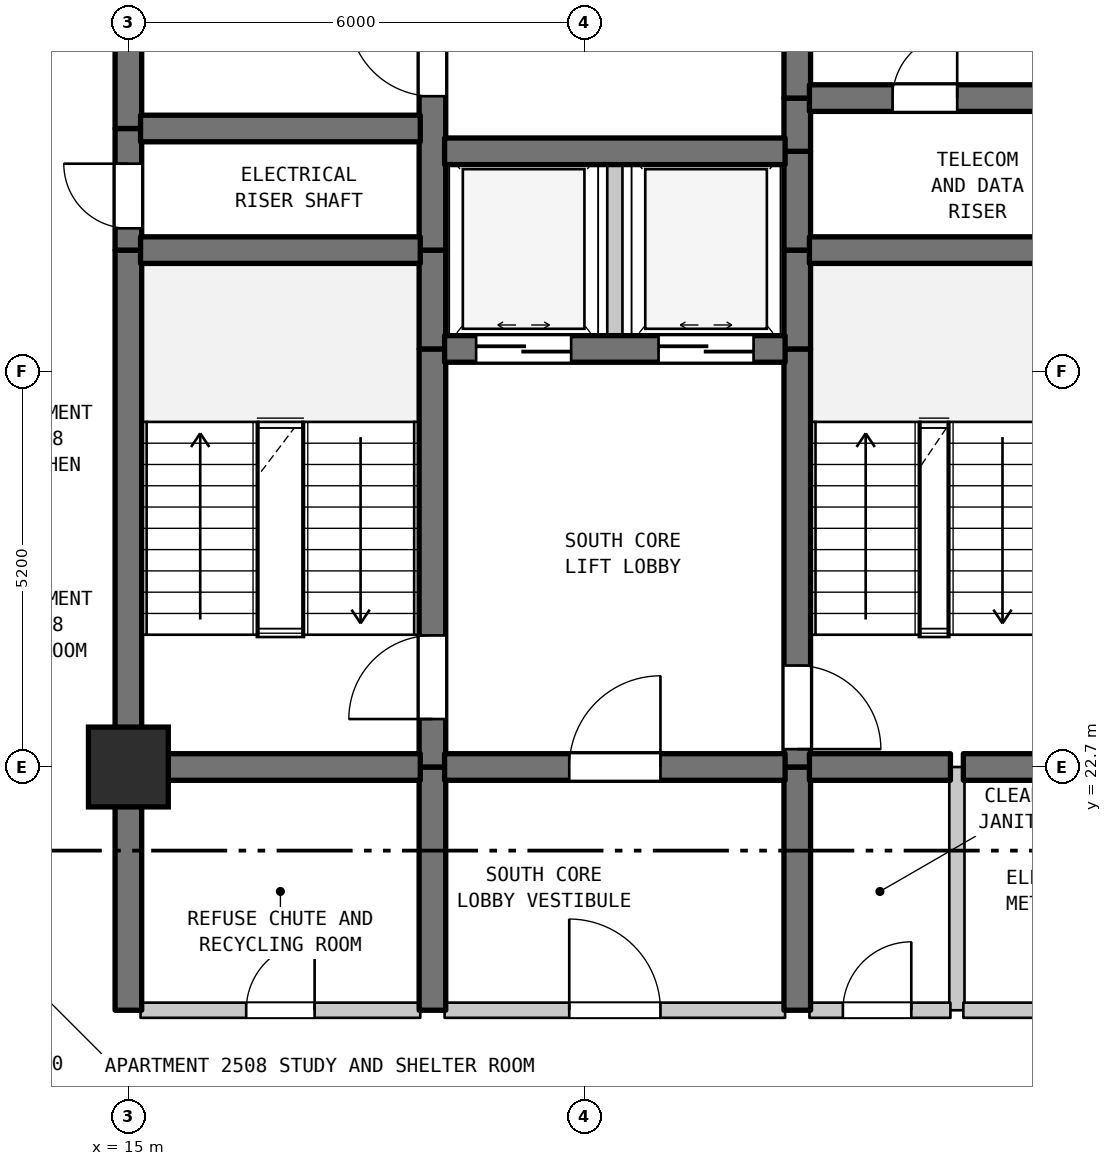
"""IFC4 building model, lengths in metres.
Left out: names, types, materials, properties, quantities, classifications, styles, units other than length and angle.
Written with IfcOpenShell. Run it as: python <this file> out.ifc"""

import sys

from ifc_helpers import new_model, si_unit, direction, frame, frame_2d, origin, origin_2d, place, context, subcontext, project, spatial, rectangle, extrude, element, fill, save


model = new_model("IFC4")
c1 = context("Model", 3, precision=1e-05, world=origin(), true_north=direction((0.0, 1.0)))
c2 = subcontext(c1, "Body", "Model", "MODEL_VIEW")
j1 = project(units=[si_unit("LENGTHUNIT", "METRE"), si_unit("PLANEANGLEUNIT", "RADIAN")], contexts=[c1])
p1 = place(None, origin())
s1 = spatial("IfcSite", under=j1, at=p1, CompositionType="ELEMENT")
p2 = place(p1, origin())
s2 = spatial("IfcBuilding", under=s1, at=p2, CompositionType="ELEMENT")
p3 = place(p2, frame((0.0, 0.0, 105.7)))
s3 = spatial("IfcBuildingStorey", under=s2, at=p3, CompositionType="ELEMENT", Elevation=105.7)
p4 = place(p3, frame((15.0, 22.7, 0.0), z_axis=(0.0, 0.0, 1.0), x_axis=(1.0, 0.0, 0.0)))
e1 = element("IfcColumn", 1, at=p4, inside=s3, PredefinedType="COLUMN", context=c2, shape_type="SweptSolid", body=[
    extrude(rectangle(XDim=1.05, YDim=1.05, at=origin_2d()), origin(), (0.0, 0.0, 1.0), 3.7),
])
p5 = place(p3, frame((15.0, 19.5, 0.0), z_axis=(0.0, 0.0, 1.0), x_axis=(0.0, 1.0, 0.0)))
e2 = element("IfcWall", 2, at=p5, inside=s3, PredefinedType="SHEAR", context=c2, shape_type="SweptSolid", body=[
    extrude(rectangle(XDim=3.2, YDim=0.35, at=frame_2d((1.6, 0.0))), origin(), (0.0, 0.0, 1.0), 3.385),
])
p6 = place(p3, frame((15.0, 22.7, 0.0), z_axis=(0.0, 0.0, 1.0), x_axis=(0.0, 1.0, 0.0)))
e3 = element("IfcWall", 3, at=p6, inside=s3, PredefinedType="SHEAR", context=c2, shape_type="SweptSolid", body=[
    extrude(rectangle(XDim=6.8, YDim=0.35, at=frame_2d((3.4, 0.0))), origin(), (0.0, 0.0, 1.0), 3.385),
])
p7 = place(p3, frame((15.0, 29.5, 0.0), z_axis=(0.0, 0.0, 1.0), x_axis=(0.0, 1.0, 0.0)))
e4 = element("IfcWall", 4, at=p7, inside=s3, PredefinedType="SHEAR", context=c2, shape_type="SweptSolid", body=[
    extrude(rectangle(XDim=1.6, YDim=0.35, at=frame_2d((0.8, 0.0))), origin(), (0.0, 0.0, 1.0), 3.385),
])
p8 = place(p7, frame((0.287, 0.0, 0.0)))
e5 = element("IfcOpeningElement", 5, at=p8, cuts=e4, PredefinedType="OPENING", context=c2, shape_type="SweptSolid", body=[
    extrude(rectangle(XDim=0.85, YDim=2.1, at=frame_2d((0.425, 1.05))), frame((0.0, 0.185, 0.0), z_axis=(0.0, -1.0, 0.0), x_axis=(1.0, 0.0, 0.0)), (0.0, 0.0, 1.0), 0.37),
])
p9 = place(p3, frame((15.0, 31.1, 0.0), z_axis=(0.0, 0.0, 1.0), x_axis=(0.0, 1.0, 0.0)))
e6 = element("IfcWall", 6, at=p9, inside=s3, PredefinedType="SHEAR", context=c2, shape_type="SweptSolid", body=[
    extrude(rectangle(XDim=6.8, YDim=0.35, at=frame_2d((3.4, 0.0))), origin(), (0.0, 0.0, 1.0), 3.385),
])
p10 = place(p3, frame((19.0, 19.5, 0.0), z_axis=(0.0, 0.0, 1.0), x_axis=(0.0, 1.0, 0.0)))
e7 = element("IfcWall", 7, at=p10, inside=s3, PredefinedType="SHEAR", context=c2, shape_type="SweptSolid", body=[
    extrude(rectangle(XDim=3.2, YDim=0.35, at=frame_2d((1.6, 0.0))), origin(), (0.0, 0.0, 1.0), 3.385),
])
p11 = place(p3, frame((19.0, 22.7, 0.0), z_axis=(0.0, 0.0, 1.0), x_axis=(0.0, 1.0, 0.0)))
e8 = element("IfcWall", 8, at=p11, inside=s3, PredefinedType="SHEAR", context=c2, shape_type="SweptSolid", body=[
    extrude(rectangle(XDim=5.5, YDim=0.35, at=frame_2d((2.75, 0.0))), origin(), (0.0, 0.0, 1.0), 3.385),
])
p12 = place(p11, frame((0.631, 0.0, 0.0)))
e9 = element("IfcOpeningElement", 9, at=p12, cuts=e8, PredefinedType="OPENING", context=c2, shape_type="SweptSolid", body=[
    extrude(rectangle(XDim=1.1, YDim=2.15, at=frame_2d((0.55, 1.075))), frame((0.0, 0.185, 0.0), z_axis=(0.0, -1.0, 0.0), x_axis=(1.0, 0.0, 0.0)), (0.0, 0.0, 1.0), 0.37),
])
p13 = place(p3, frame((19.0, 28.2, 0.0), z_axis=(0.0, 0.0, 1.0), x_axis=(0.0, 1.0, 0.0)))
e10 = element("IfcWall", 10, at=p13, inside=s3, PredefinedType="SHEAR", context=c2, shape_type="SweptSolid", body=[
    extrude(rectangle(XDim=1.3, YDim=0.35, at=frame_2d((0.65, 0.0))), origin(), (0.0, 0.0, 1.0), 3.385),
])
p14 = place(p3, frame((19.0, 29.5, 0.0), z_axis=(0.0, 0.0, 1.0), x_axis=(0.0, 1.0, 0.0)))
e11 = element("IfcWall", 11, at=p14, inside=s3, PredefinedType="SHEAR", context=c2, shape_type="SweptSolid", body=[
    extrude(rectangle(XDim=5.5, YDim=0.35, at=frame_2d((2.75, 0.0))), origin(), (0.0, 0.0, 1.0), 3.385),
])
p15 = place(p14, frame((2.025, 0.0, 0.0)))
e12 = element("IfcOpeningElement", 12, at=p15, cuts=e11, PredefinedType="OPENING", context=c2, shape_type="SweptSolid", body=[
    extrude(rectangle(XDim=1.1, YDim=2.15, at=frame_2d((0.55, 1.075))), frame((0.0, 0.185, 0.0), z_axis=(0.0, -1.0, 0.0), x_axis=(1.0, 0.0, 0.0)), (0.0, 0.0, 1.0), 0.37),
])
p16 = place(p3, frame((21.4, 28.2, 0.0), z_axis=(0.0, 0.0, 1.0), x_axis=(0.0, 1.0, 0.0)))
e13 = element("IfcWall", 13, at=p16, inside=s3, PredefinedType="STANDARD", context=c2, shape_type="SweptSolid", body=[
    extrude(rectangle(XDim=2.6, YDim=0.2, at=frame_2d((1.3, 0.0))), origin(), (0.0, 0.0, 1.0), 3.385),
])
p17 = place(p3, frame((23.8, 19.5, 0.0), z_axis=(0.0, 0.0, 1.0), x_axis=(0.0, 1.0, 0.0)))
e14 = element("IfcWall", 14, at=p17, inside=s3, PredefinedType="SHEAR", context=c2, shape_type="SweptSolid", body=[
    extrude(rectangle(XDim=3.2, YDim=0.35, at=frame_2d((1.6, 0.0))), origin(), (0.0, 0.0, 1.0), 3.385),
])
p18 = place(p3, frame((23.8, 22.7, 0.0), z_axis=(0.0, 0.0, 1.0), x_axis=(0.0, 1.0, 0.0)))
e15 = element("IfcWall", 15, at=p18, inside=s3, PredefinedType="SHEAR", context=c2, shape_type="SweptSolid", body=[
    extrude(rectangle(XDim=5.5, YDim=0.35, at=frame_2d((2.75, 0.0))), origin(), (0.0, 0.0, 1.0), 3.385),
])
p19 = place(p18, frame((0.235, 0.0, 0.0)))
e16 = element("IfcOpeningElement", 16, at=p19, cuts=e15, PredefinedType="OPENING", context=c2, shape_type="SweptSolid", body=[
    extrude(rectangle(XDim=1.1, YDim=2.15, at=frame_2d((0.55, 1.075))), frame((0.0, 0.185, 0.0), z_axis=(0.0, -1.0, 0.0), x_axis=(1.0, 0.0, 0.0)), (0.0, 0.0, 1.0), 0.37),
])
for number, where, z_axis, x_axis in (
    (17, (23.8, 28.2, 0.0), (0.0, 0.0, 1.0), (0.0, 1.0, 0.0)),
    (18, (23.8, 29.5, 0.0), (0.0, 0.0, 1.0), (0.0, 1.0, 0.0)),
):
    element("IfcWall", number, at=place(p3, frame(where, z_axis=z_axis, x_axis=x_axis)), inside=s3, PredefinedType="SHEAR", context=c2, shape_type="SweptSolid", body=[
        extrude(rectangle(XDim=1.3, YDim=0.35, at=frame_2d((0.65, 0.0))), origin(), (0.0, 0.0, 1.0), 3.385),
    ])
p20 = place(p3, frame((23.8, 30.8, 0.0), z_axis=(0.0, 0.0, 1.0), x_axis=(0.0, 1.0, 0.0)))
e19 = element("IfcWall", 19, at=p20, inside=s3, PredefinedType="SHEAR", context=c2, shape_type="SweptSolid", body=[
    extrude(rectangle(XDim=0.7, YDim=0.35, at=frame_2d((0.35, 0.0))), origin(), (0.0, 0.0, 1.0), 3.385),
])
p21 = place(p3, frame((23.8, 31.5, 0.0), z_axis=(0.0, 0.0, 1.0), x_axis=(0.0, 1.0, 0.0)))
e20 = element("IfcWall", 20, at=p21, inside=s3, PredefinedType="SHEAR", context=c2, shape_type="SweptSolid", body=[
    extrude(rectangle(XDim=3.5, YDim=0.35, at=frame_2d((1.75, 0.0))), origin(), (0.0, 0.0, 1.0), 3.385),
])
p22 = place(p21, frame((1.127, 0.0, 0.0)))
e21 = element("IfcOpeningElement", 21, at=p22, cuts=e20, PredefinedType="OPENING", context=c2, shape_type="SweptSolid", body=[
    extrude(rectangle(XDim=1.1, YDim=2.15, at=frame_2d((0.55, 1.075))), frame((0.0, 0.185, 0.0), z_axis=(0.0, -1.0, 0.0), x_axis=(1.0, 0.0, 0.0)), (0.0, 0.0, 1.0), 0.37),
])
p23 = place(p3, frame((25.9, 19.5, 0.0), z_axis=(0.0, 0.0, 1.0), x_axis=(0.0, 1.0, 0.0)))
e22 = element("IfcWall", 22, at=p23, inside=s3, PredefinedType="STANDARD", context=c2, shape_type="SweptSolid", body=[
    extrude(rectangle(XDim=3.2, YDim=0.2, at=frame_2d((1.6, 0.0))), origin(), (0.0, 0.0, 1.0), 3.385),
])
p24 = place(p3, frame((15.16, 19.5, 0.0), z_axis=(0.0, 0.0, 1.0), x_axis=(1.0, 0.0, 0.0)))
e23 = element("IfcWall", 23, at=p24, inside=s3, PredefinedType="STANDARD", context=c2, shape_type="SweptSolid", body=[
    extrude(rectangle(XDim=3.68, YDim=0.2, at=frame_2d((1.84, 0.0))), origin(), (0.0, 0.0, 1.0), 3.385),
])
p25 = place(p24, frame((1.39, 0.0, 0.0)))
e24 = element("IfcOpeningElement", 24, at=p25, cuts=e23, PredefinedType="OPENING", context=c2, shape_type="SweptSolid", body=[
    extrude(rectangle(XDim=0.9, YDim=2.15, at=frame_2d((0.45, 1.075))), frame((0.0, 0.11, 0.0), z_axis=(0.0, -1.0, 0.0), x_axis=(1.0, 0.0, 0.0)), (0.0, 0.0, 1.0), 0.22),
])
p26 = place(p3, frame((19.16, 19.5, 0.0), z_axis=(0.0, 0.0, 1.0), x_axis=(1.0, 0.0, 0.0)))
e25 = element("IfcWall", 25, at=p26, inside=s3, PredefinedType="STANDARD", context=c2, shape_type="SweptSolid", body=[
    extrude(rectangle(XDim=4.48, YDim=0.2, at=frame_2d((2.24, 0.0))), origin(), (0.0, 0.0, 1.0), 3.385),
])
p27 = place(p26, frame((1.64, 0.0, 0.0)))
e26 = element("IfcOpeningElement", 26, at=p27, cuts=e25, PredefinedType="OPENING", context=c2, shape_type="SweptSolid", body=[
    extrude(rectangle(XDim=1.2, YDim=2.2, at=frame_2d((0.6, 1.1))), frame((0.0, 0.11, 0.0), z_axis=(0.0, -1.0, 0.0), x_axis=(1.0, 0.0, 0.0)), (0.0, 0.0, 1.0), 0.22),
])
p28 = place(p3, frame((23.96, 19.5, 0.0), z_axis=(0.0, 0.0, 1.0), x_axis=(1.0, 0.0, 0.0)))
e27 = element("IfcWall", 27, at=p28, inside=s3, PredefinedType="STANDARD", context=c2, shape_type="SweptSolid", body=[
    extrude(rectangle(XDim=1.855, YDim=0.2, at=frame_2d((0.927, 0.0))), origin(), (0.0, 0.0, 1.0), 3.385),
])
p29 = place(p28, frame((0.44, 0.0, 0.0)))
e28 = element("IfcOpeningElement", 28, at=p29, cuts=e27, PredefinedType="OPENING", context=c2, shape_type="SweptSolid", body=[
    extrude(rectangle(XDim=0.9, YDim=2.15, at=frame_2d((0.45, 1.075))), frame((0.0, 0.11, 0.0), z_axis=(0.0, -1.0, 0.0), x_axis=(1.0, 0.0, 0.0)), (0.0, 0.0, 1.0), 0.22),
])
p30 = place(p3, frame((25.985, 19.5, 0.0), z_axis=(0.0, 0.0, 1.0), x_axis=(1.0, 0.0, 0.0)))
e29 = element("IfcWall", 29, at=p30, inside=s3, PredefinedType="STANDARD", context=c2, shape_type="SweptSolid", body=[
    extrude(rectangle(XDim=4.655, YDim=0.2, at=frame_2d((2.327, 0.0))), origin(), (0.0, 0.0, 1.0), 3.385),
])
p31 = place(p30, frame((1.845, 0.0, 0.0)))
e30 = element("IfcOpeningElement", 30, at=p31, cuts=e29, PredefinedType="OPENING", context=c2, shape_type="SweptSolid", body=[
    extrude(rectangle(XDim=0.9, YDim=2.15, at=frame_2d((0.45, 1.075))), frame((0.0, 0.11, 0.0), z_axis=(0.0, -1.0, 0.0), x_axis=(1.0, 0.0, 0.0)), (0.0, 0.0, 1.0), 0.22),
])
p32 = place(p3, frame((15.16, 22.7, 0.0), z_axis=(0.0, 0.0, 1.0), x_axis=(1.0, 0.0, 0.0)))
e31 = element("IfcWall", 31, at=p32, inside=s3, PredefinedType="SHEAR", context=c2, shape_type="SweptSolid", body=[
    extrude(rectangle(XDim=3.68, YDim=0.35, at=frame_2d((1.84, 0.0))), origin(), (0.0, 0.0, 1.0), 3.385),
])
p33 = place(p3, frame((19.16, 22.7, 0.0), z_axis=(0.0, 0.0, 1.0), x_axis=(1.0, 0.0, 0.0)))
e32 = element("IfcWall", 32, at=p33, inside=s3, PredefinedType="SHEAR", context=c2, shape_type="SweptSolid", body=[
    extrude(rectangle(XDim=4.48, YDim=0.35, at=frame_2d((2.24, 0.0))), origin(), (0.0, 0.0, 1.0), 3.385),
])
p34 = place(p33, frame((1.64, 0.0, 0.0)))
e33 = element("IfcOpeningElement", 33, at=p34, cuts=e32, PredefinedType="OPENING", context=c2, shape_type="SweptSolid", body=[
    extrude(rectangle(XDim=1.2, YDim=2.2, at=frame_2d((0.6, 1.1))), frame((0.0, 0.185, 0.0), z_axis=(0.0, -1.0, 0.0), x_axis=(1.0, 0.0, 0.0)), (0.0, 0.0, 1.0), 0.37),
])
p35 = place(p3, frame((23.96, 22.7, 0.0), z_axis=(0.0, 0.0, 1.0), x_axis=(1.0, 0.0, 0.0)))
e34 = element("IfcWall", 34, at=p35, inside=s3, PredefinedType="SHEAR", context=c2, shape_type="SweptSolid", body=[
    extrude(rectangle(XDim=1.855, YDim=0.35, at=frame_2d((0.927, 0.0))), origin(), (0.0, 0.0, 1.0), 3.385),
])
p36 = place(p3, frame((25.985, 22.7, 0.0), z_axis=(0.0, 0.0, 1.0), x_axis=(1.0, 0.0, 0.0)))
e35 = element("IfcWall", 35, at=p36, inside=s3, PredefinedType="SHEAR", context=c2, shape_type="SweptSolid", body=[
    extrude(rectangle(XDim=1.155, YDim=0.35, at=frame_2d((0.577, 0.0))), origin(), (0.0, 0.0, 1.0), 3.385),
])
p37 = place(p3, frame((19.16, 28.2, 0.0), z_axis=(0.0, 0.0, 1.0), x_axis=(1.0, 0.0, 0.0)))
e36 = element("IfcWall", 36, at=p37, inside=s3, PredefinedType="SHEAR", context=c2, shape_type="SweptSolid", body=[
    extrude(rectangle(XDim=4.48, YDim=0.35, at=frame_2d((2.24, 0.0))), origin(), (0.0, 0.0, 1.0), 3.385),
])
p38 = place(p37, frame((0.415, 0.0, 0.0)))
e37 = element("IfcOpeningElement", 37, at=p38, cuts=e36, PredefinedType="OPENING", context=c2, shape_type="SweptSolid", body=[
    extrude(rectangle(XDim=1.25, YDim=2.2, at=frame_2d((0.625, 1.1))), frame((0.0, 0.185, 0.0), z_axis=(0.0, -1.0, 0.0), x_axis=(1.0, 0.0, 0.0)), (0.0, 0.0, 1.0), 0.37),
])
p39 = place(p37, frame((2.815, 0.0, 0.0)))
e38 = element("IfcOpeningElement", 38, at=p39, cuts=e36, PredefinedType="OPENING", context=c2, shape_type="SweptSolid", body=[
    extrude(rectangle(XDim=1.25, YDim=2.2, at=frame_2d((0.625, 1.1))), frame((0.0, 0.185, 0.0), z_axis=(0.0, -1.0, 0.0), x_axis=(1.0, 0.0, 0.0)), (0.0, 0.0, 1.0), 0.37),
])
p40 = place(p3, frame((15.16, 29.5, 0.0), z_axis=(0.0, 0.0, 1.0), x_axis=(1.0, 0.0, 0.0)))
e39 = element("IfcWall", 39, at=p40, inside=s3, PredefinedType="SHEAR", context=c2, shape_type="SweptSolid", body=[
    extrude(rectangle(XDim=3.68, YDim=0.35, at=frame_2d((1.84, 0.0))), origin(), (0.0, 0.0, 1.0), 3.385),
])
p41 = place(p3, frame((23.96, 29.5, 0.0), z_axis=(0.0, 0.0, 1.0), x_axis=(1.0, 0.0, 0.0)))
e40 = element("IfcWall", 40, at=p41, inside=s3, PredefinedType="SHEAR", context=c2, shape_type="SweptSolid", body=[
    extrude(rectangle(XDim=3.18, YDim=0.35, at=frame_2d((1.59, 0.0))), origin(), (0.0, 0.0, 1.0), 3.385),
])
p42 = place(p3, frame((19.16, 30.8, 0.0), z_axis=(0.0, 0.0, 1.0), x_axis=(1.0, 0.0, 0.0)))
e41 = element("IfcWall", 41, at=p42, inside=s3, PredefinedType="SHEAR", context=c2, shape_type="SweptSolid", body=[
    extrude(rectangle(XDim=4.48, YDim=0.35, at=frame_2d((2.24, 0.0))), origin(), (0.0, 0.0, 1.0), 3.385),
])
p43 = place(p3, frame((15.16, 31.1, 0.0), z_axis=(0.0, 0.0, 1.0), x_axis=(1.0, 0.0, 0.0)))
e42 = element("IfcWall", 42, at=p43, inside=s3, PredefinedType="SHEAR", context=c2, shape_type="SweptSolid", body=[
    extrude(rectangle(XDim=3.68, YDim=0.35, at=frame_2d((1.84, 0.0))), origin(), (0.0, 0.0, 1.0), 3.385),
])
p44 = place(p3, frame((23.96, 31.5, 0.0), z_axis=(0.0, 0.0, 1.0), x_axis=(1.0, 0.0, 0.0)))
e43 = element("IfcWall", 43, at=p44, inside=s3, PredefinedType="SHEAR", context=c2, shape_type="SweptSolid", body=[
    extrude(rectangle(XDim=3.18, YDim=0.35, at=frame_2d((1.59, 0.0))), origin(), (0.0, 0.0, 1.0), 3.385),
])
p45 = place(p44, frame((1.094, 0.0, 0.0)))
e44 = element("IfcOpeningElement", 44, at=p45, cuts=e43, PredefinedType="OPENING", context=c2, shape_type="SweptSolid", body=[
    extrude(rectangle(XDim=0.85, YDim=2.1, at=frame_2d((0.425, 1.05))), frame((0.0, 0.185, 0.0), z_axis=(0.0, -1.0, 0.0), x_axis=(1.0, 0.0, 0.0)), (0.0, 0.0, 1.0), 0.37),
])
p46 = place(p8, origin())
e45 = element("IfcDoor", 45, at=p46, inside=s3, OperationType="SINGLE_SWING_RIGHT", PredefinedType="DOOR", context=c2, shape_type="SweptSolid", body=[
    extrude(rectangle(XDim=0.85, YDim=2.1, at=frame_2d((0.425, 1.05))), frame((0.0, 0.025, 0.0), z_axis=(0.0, -1.0, 0.0), x_axis=(1.0, 0.0, 0.0)), (0.0, 0.0, 1.0), 0.05),
])
fill(e5, e45)
p47 = place(p12, origin())
e46 = element("IfcDoor", 46, at=p47, inside=s3, OperationType="SINGLE_SWING_LEFT", PredefinedType="DOOR", context=c2, shape_type="SweptSolid", body=[
    extrude(rectangle(XDim=1.1, YDim=2.15, at=frame_2d((0.55, 1.075))), frame((0.0, 0.025, 0.0), z_axis=(0.0, -1.0, 0.0), x_axis=(1.0, 0.0, 0.0)), (0.0, 0.0, 1.0), 0.05),
])
fill(e9, e46)
p48 = place(p15, origin())
e47 = element("IfcDoor", 47, at=p48, inside=s3, OperationType="SINGLE_SWING_RIGHT", PredefinedType="DOOR", context=c2, shape_type="SweptSolid", body=[
    extrude(rectangle(XDim=1.1, YDim=2.15, at=frame_2d((0.55, 1.075))), frame((0.0, 0.025, 0.0), z_axis=(0.0, -1.0, 0.0), x_axis=(1.0, 0.0, 0.0)), (0.0, 0.0, 1.0), 0.05),
])
fill(e12, e47)
p49 = place(p19, frame((1.1, 0.0, 0.0), z_axis=(0.0, 0.0, 1.0), x_axis=(-1.0, 0.0, 0.0)))
e48 = element("IfcDoor", 48, at=p49, inside=s3, OperationType="SINGLE_SWING_LEFT", PredefinedType="DOOR", context=c2, shape_type="SweptSolid", body=[
    extrude(rectangle(XDim=1.1, YDim=2.15, at=frame_2d((0.55, 1.075))), frame((0.0, 0.025, 0.0), z_axis=(0.0, -1.0, 0.0), x_axis=(1.0, 0.0, 0.0)), (0.0, 0.0, 1.0), 0.05),
])
fill(e16, e48)
p50 = place(p25, origin())
e49 = element("IfcDoor", 49, at=p50, inside=s3, OperationType="SINGLE_SWING_RIGHT", PredefinedType="DOOR", context=c2, shape_type="SweptSolid", body=[
    extrude(rectangle(XDim=0.9, YDim=2.15, at=frame_2d((0.45, 1.075))), frame((0.0, 0.025, 0.0), z_axis=(0.0, -1.0, 0.0), x_axis=(1.0, 0.0, 0.0)), (0.0, 0.0, 1.0), 0.05),
])
fill(e24, e49)
p51 = place(p27, origin())
e50 = element("IfcDoor", 50, at=p51, inside=s3, OperationType="SINGLE_SWING_LEFT", PredefinedType="DOOR", context=c2, shape_type="SweptSolid", body=[
    extrude(rectangle(XDim=1.2, YDim=2.2, at=frame_2d((0.6, 1.1))), frame((0.0, 0.025, 0.0), z_axis=(0.0, -1.0, 0.0), x_axis=(1.0, 0.0, 0.0)), (0.0, 0.0, 1.0), 0.05),
])
fill(e26, e50)
p52 = place(p29, origin())
e51 = element("IfcDoor", 51, at=p52, inside=s3, OperationType="SINGLE_SWING_RIGHT", PredefinedType="DOOR", context=c2, shape_type="SweptSolid", body=[
    extrude(rectangle(XDim=0.9, YDim=2.15, at=frame_2d((0.45, 1.075))), frame((0.0, 0.025, 0.0), z_axis=(0.0, -1.0, 0.0), x_axis=(1.0, 0.0, 0.0)), (0.0, 0.0, 1.0), 0.05),
])
fill(e28, e51)
p53 = place(p34, origin())
e52 = element("IfcDoor", 52, at=p53, inside=s3, OperationType="SINGLE_SWING_RIGHT", PredefinedType="DOOR", context=c2, shape_type="SweptSolid", body=[
    extrude(rectangle(XDim=1.2, YDim=2.2, at=frame_2d((0.6, 1.1))), frame((0.0, 0.025, 0.0), z_axis=(0.0, -1.0, 0.0), x_axis=(1.0, 0.0, 0.0)), (0.0, 0.0, 1.0), 0.05),
])
fill(e33, e52)
p54 = place(p38, origin())
e53 = element("IfcDoor", 53, at=p54, inside=s3, OperationType="DOUBLE_DOOR_SLIDING", PredefinedType="DOOR", context=c2, shape_type="SweptSolid", body=[
    extrude(rectangle(XDim=1.25, YDim=2.2, at=frame_2d((0.625, 1.1))), frame((0.0, 0.025, 0.0), z_axis=(0.0, -1.0, 0.0), x_axis=(1.0, 0.0, 0.0)), (0.0, 0.0, 1.0), 0.05),
])
fill(e37, e53)
p55 = place(p39, origin())
e54 = element("IfcDoor", 54, at=p55, inside=s3, OperationType="DOUBLE_DOOR_SLIDING", PredefinedType="DOOR", context=c2, shape_type="SweptSolid", body=[
    extrude(rectangle(XDim=1.25, YDim=2.2, at=frame_2d((0.625, 1.1))), frame((0.0, 0.025, 0.0), z_axis=(0.0, -1.0, 0.0), x_axis=(1.0, 0.0, 0.0)), (0.0, 0.0, 1.0), 0.05),
])
fill(e38, e54)
p56 = place(p45, origin())
e55 = element("IfcDoor", 55, at=p56, inside=s3, OperationType="SINGLE_SWING_RIGHT", PredefinedType="DOOR", context=c2, shape_type="SweptSolid", body=[
    extrude(rectangle(XDim=0.85, YDim=2.1, at=frame_2d((0.425, 1.05))), frame((0.0, 0.025, 0.0), z_axis=(0.0, -1.0, 0.0), x_axis=(1.0, 0.0, 0.0)), (0.0, 0.0, 1.0), 0.05),
])
fill(e44, e55)
save(model, sys.argv[1])
